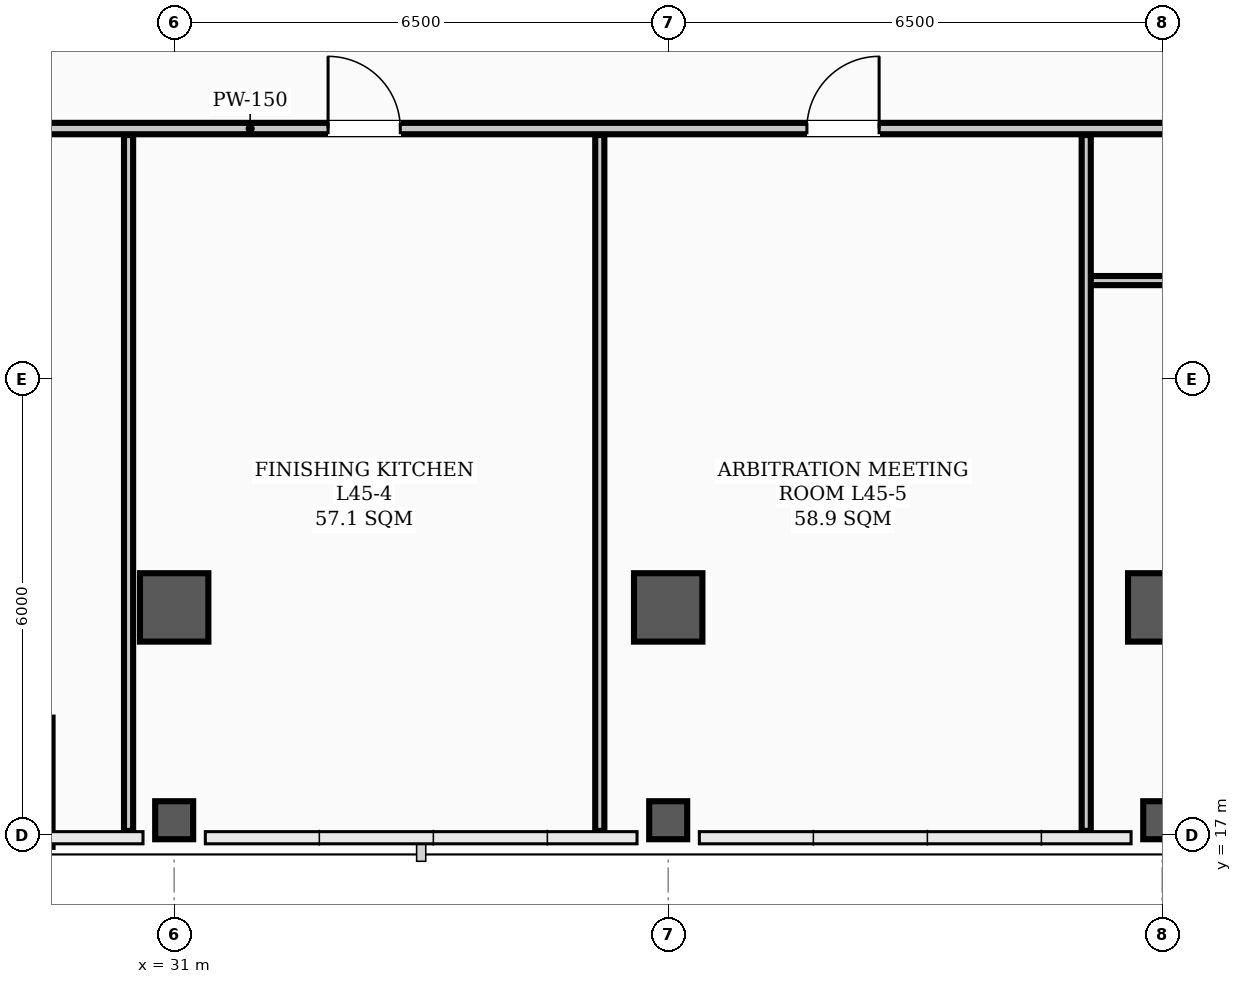
"""IFC4 building model, lengths in metres.
Left out: names, types, materials, properties, quantities, classifications, styles, units other than length and angle.
Written with IfcOpenShell. Run it as: python <this file> out.ifc"""

import sys

from ifc_helpers import new_model, si_unit, direction, frame, frame_2d, origin, origin_2d, place, context, subcontext, project, spatial, rectangle, hollow_rectangle, extrude, element, fill, save


model = new_model("IFC4")
c1 = context("Model", 3, precision=1e-05, world=origin(), true_north=direction((0.0, 1.0)))
c2 = subcontext(c1, "Body", "Model", "MODEL_VIEW")
j1 = project(units=[si_unit("LENGTHUNIT", "METRE"), si_unit("PLANEANGLEUNIT", "RADIAN")], contexts=[c1])
p1 = place(None, origin())
s1 = spatial("IfcSite", under=j1, at=p1, CompositionType="ELEMENT")
p2 = place(p1, origin())
s2 = spatial("IfcBuilding", under=s1, at=p2, CompositionType="ELEMENT")
p3 = place(p2, frame((0.0, 0.0, 181.2)))
s3 = spatial("IfcBuildingStorey", under=s2, at=p3, CompositionType="ELEMENT", Elevation=181.2)
for number, where, z_axis, x_axis in (
    (1, (31.0, 20.0, 0.0), (0.0, 0.0, 1.0), (1.0, 0.0, 0.0)),
    (2, (37.5, 20.0, 0.0), (0.0, 0.0, 1.0), (1.0, 0.0, 0.0)),
    (3, (44.0, 20.0, 0.0), (0.0, 0.0, 1.0), (1.0, 0.0, 0.0)),
):
    element("IfcColumn", number, at=place(p3, frame(where, z_axis=z_axis, x_axis=x_axis)), inside=s3, PredefinedType="COLUMN", context=c2, shape_type="SweptSolid", body=[
        extrude(hollow_rectangle(XDim=0.9, YDim=0.9, WallThickness=0.035, InnerFilletRadius=0.017, OuterFilletRadius=0.052, at=origin_2d()), origin(), (0.0, 0.0, 1.0), 3.9),
    ])
for number, where, z_axis, x_axis in (
    (4, (31.0, 17.2, 0.0), (0.0, 0.0, 1.0), (1.0, 0.0, 0.0)),
    (5, (37.5, 17.2, 0.0), (0.0, 0.0, 1.0), (1.0, 0.0, 0.0)),
    (6, (44.0, 17.2, 0.0), (0.0, 0.0, 1.0), (1.0, 0.0, 0.0)),
):
    element("IfcColumn", number, at=place(p3, frame(where, z_axis=z_axis, x_axis=x_axis)), inside=s3, PredefinedType="COLUMN", context=c2, shape_type="SweptSolid", body=[
        extrude(hollow_rectangle(XDim=0.5, YDim=0.5, WallThickness=0.024, InnerFilletRadius=0.012, OuterFilletRadius=0.036, at=origin_2d()), origin(), (0.0, 0.0, 1.0), 3.9),
    ])
p4 = place(p3, frame((29.3, 18.55, 0.0), z_axis=(0.0, 0.0, 1.0), x_axis=(0.0, -1.0, 0.0)))
e7 = element("IfcWall", 7, at=p4, inside=s3, PredefinedType="PARAPET", context=c2, shape_type="SweptSolid", body=[
    extrude(rectangle(XDim=1.7, YDim=0.2, at=frame_2d((0.85, 0.0))), origin(), (0.0, 0.0, 1.0), 1.2),
])
p5 = place(p3, frame((10.31, 26.3, 0.0), z_axis=(0.0, 0.0, 1.0), x_axis=(1.0, 0.0, 0.0)))
e8 = element("IfcWall", 8, at=p5, inside=s3, PredefinedType="PARTITIONING", context=c2, shape_type="SweptSolid", body=[
    extrude(rectangle(XDim=43.38, YDim=0.15, at=frame_2d((21.69, 0.0))), origin(), (0.0, 0.0, 1.0), 3.2),
])
p6 = place(p5, frame((0.575, 0.0, 0.0)))
e9 = element("IfcOpeningElement", 9, at=p6, cuts=e8, PredefinedType="OPENING", context=c2, shape_type="SweptSolid", body=[
    extrude(rectangle(XDim=0.95, YDim=2.08, at=frame_2d((0.475, 1.04))), frame((0.0, 0.085, 0.0), z_axis=(0.0, -1.0, 0.0), x_axis=(1.0, 0.0, 0.0)), (0.0, 0.0, 1.0), 0.17),
])
p7 = place(p5, frame((9.415, 0.0, 0.0)))
e10 = element("IfcOpeningElement", 10, at=p7, cuts=e8, PredefinedType="OPENING", context=c2, shape_type="SweptSolid", body=[
    extrude(rectangle(XDim=0.95, YDim=2.08, at=frame_2d((0.475, 1.04))), frame((0.0, 0.085, 0.0), z_axis=(0.0, -1.0, 0.0), x_axis=(1.0, 0.0, 0.0)), (0.0, 0.0, 1.0), 0.17),
])
p8 = place(p5, frame((16.115, 0.0, 0.0)))
e11 = element("IfcOpeningElement", 11, at=p8, cuts=e8, PredefinedType="OPENING", context=c2, shape_type="SweptSolid", body=[
    extrude(rectangle(XDim=0.95, YDim=2.08, at=frame_2d((0.475, 1.04))), frame((0.0, 0.085, 0.0), z_axis=(0.0, -1.0, 0.0), x_axis=(1.0, 0.0, 0.0)), (0.0, 0.0, 1.0), 0.17),
])
p9 = place(p5, frame((22.715, 0.0, 0.0)))
e12 = element("IfcOpeningElement", 12, at=p9, cuts=e8, PredefinedType="OPENING", context=c2, shape_type="SweptSolid", body=[
    extrude(rectangle(XDim=0.95, YDim=2.08, at=frame_2d((0.475, 1.04))), frame((0.0, 0.085, 0.0), z_axis=(0.0, -1.0, 0.0), x_axis=(1.0, 0.0, 0.0)), (0.0, 0.0, 1.0), 0.17),
])
p10 = place(p5, frame((29.015, 0.0, 0.0)))
e13 = element("IfcOpeningElement", 13, at=p10, cuts=e8, PredefinedType="OPENING", context=c2, shape_type="SweptSolid", body=[
    extrude(rectangle(XDim=0.95, YDim=2.08, at=frame_2d((0.475, 1.04))), frame((0.0, 0.085, 0.0), z_axis=(0.0, -1.0, 0.0), x_axis=(1.0, 0.0, 0.0)), (0.0, 0.0, 1.0), 0.17),
])
p11 = place(p5, frame((34.79, 0.0, 0.0)))
e14 = element("IfcOpeningElement", 14, at=p11, cuts=e8, PredefinedType="OPENING", context=c2, shape_type="SweptSolid", body=[
    extrude(rectangle(XDim=0.95, YDim=2.08, at=frame_2d((0.475, 1.04))), frame((0.0, 0.085, 0.0), z_axis=(0.0, -1.0, 0.0), x_axis=(1.0, 0.0, 0.0)), (0.0, 0.0, 1.0), 0.17),
])
p12 = place(p3, frame((43.0, 24.3, 0.0), z_axis=(0.0, 0.0, 1.0), x_axis=(1.0, 0.0, 0.0)))
e15 = element("IfcWall", 15, at=p12, inside=s3, PredefinedType="PARTITIONING", context=c2, shape_type="SweptSolid", body=[
    extrude(rectangle(XDim=10.69, YDim=0.12, at=frame_2d((5.345, 0.0))), origin(), (0.0, 0.0, 1.0), 3.2),
])
p13 = place(p12, frame((4.87, 0.0, 0.0)))
e16 = element("IfcOpeningElement", 16, at=p13, cuts=e15, PredefinedType="OPENING", context=c2, shape_type="SweptSolid", body=[
    extrude(rectangle(XDim=0.95, YDim=2.08, at=frame_2d((0.475, 1.04))), frame((0.0, 0.07, 0.0), z_axis=(0.0, -1.0, 0.0), x_axis=(1.0, 0.0, 0.0)), (0.0, 0.0, 1.0), 0.14),
])
for number, where, z_axis, x_axis in (
    (17, (30.4, 17.06, 0.0), (0.0, 0.0, 1.0), (0.0, 1.0, 0.0)),
    (18, (36.6, 17.06, 0.0), (0.0, 0.0, 1.0), (0.0, 1.0, 0.0)),
    (19, (43.0, 17.06, 0.0), (0.0, 0.0, 1.0), (0.0, 1.0, 0.0)),
):
    element("IfcWall", number, at=place(p3, frame(where, z_axis=z_axis, x_axis=x_axis)), inside=s3, PredefinedType="PARTITIONING", context=c2, shape_type="SweptSolid", body=[
        extrude(rectangle(XDim=9.155, YDim=0.12, at=frame_2d((4.578, 0.0))), origin(), (0.0, 0.0, 1.0), 3.1),
    ])
p14 = place(p9, origin())
e20 = element("IfcDoor", 20, at=p14, inside=s3, OperationType="SINGLE_SWING_LEFT", PredefinedType="DOOR", context=c2, shape_type="SweptSolid", body=[
    extrude(rectangle(XDim=0.95, YDim=2.08, at=frame_2d((0.475, 1.04))), frame((0.0, 0.025, 0.0), z_axis=(0.0, -1.0, 0.0), x_axis=(1.0, 0.0, 0.0)), (0.0, 0.0, 1.0), 0.05),
])
fill(e12, e20)
p15 = place(p10, origin())
e21 = element("IfcDoor", 21, at=p15, inside=s3, OperationType="SINGLE_SWING_RIGHT", PredefinedType="DOOR", context=c2, shape_type="SweptSolid", body=[
    extrude(rectangle(XDim=0.95, YDim=2.08, at=frame_2d((0.475, 1.04))), frame((0.0, 0.025, 0.0), z_axis=(0.0, -1.0, 0.0), x_axis=(1.0, 0.0, 0.0)), (0.0, 0.0, 1.0), 0.05),
])
fill(e13, e21)
save(model, sys.argv[1])
